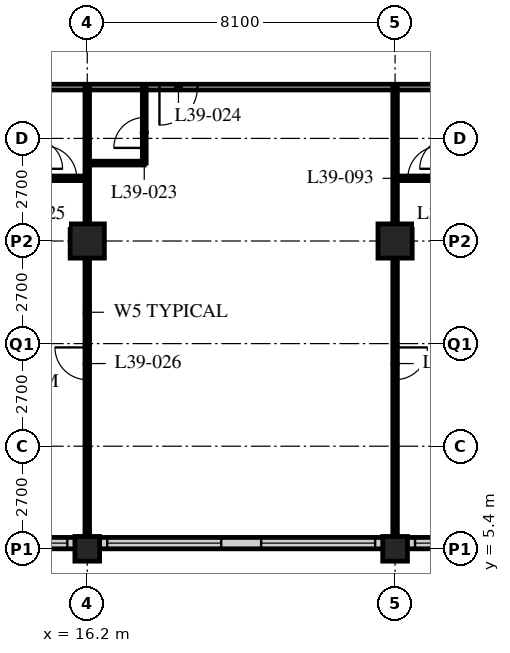
"""IFC4 building model, lengths in metres.
Left out: names, types, materials, properties, quantities, classifications, styles, units other than length and angle.
Written with IfcOpenShell. Run it as: python <this file> out.ifc"""

import sys

from ifc_helpers import new_model, si_unit, direction, frame, frame_2d, origin, origin_2d, place, context, subcontext, project, spatial, rectangle, hollow_rectangle, extrude, element, fill, save


model = new_model("IFC4")
c1 = context("Model", 3, precision=1e-05, world=origin(), true_north=direction((0.0, 1.0)))
c2 = subcontext(c1, "Body", "Model", "MODEL_VIEW")
j1 = project(units=[si_unit("LENGTHUNIT", "METRE"), si_unit("PLANEANGLEUNIT", "RADIAN")], contexts=[c1])
p1 = place(None, origin())
s1 = spatial("IfcSite", under=j1, at=p1, CompositionType="ELEMENT")
p2 = place(p1, origin())
s2 = spatial("IfcBuilding", under=s1, at=p2, CompositionType="ELEMENT")
p3 = place(p2, frame((0.0, 0.0, 151.0)))
s3 = spatial("IfcBuildingStorey", under=s2, at=p3, CompositionType="ELEMENT", Elevation=151.0)
p4 = place(p3, frame((16.2, 5.4, 0.0), z_axis=(0.0, 0.0, 1.0), x_axis=(1.0, 0.0, 0.0)))
e1 = element("IfcColumn", 1, at=p4, inside=s3, PredefinedType="COLUMN", context=c2, shape_type="SweptSolid", body=[
    extrude(hollow_rectangle(XDim=0.65, YDim=0.65, WallThickness=0.055, at=origin_2d()), origin(), (0.0, 0.0, 1.0), 3.4),
])
p5 = place(p3, frame((16.2, 13.5, 0.0), z_axis=(0.0, 0.0, 1.0), x_axis=(1.0, 0.0, 0.0)))
e2 = element("IfcColumn", 2, at=p5, inside=s3, PredefinedType="COLUMN", context=c2, shape_type="SweptSolid", body=[
    extrude(hollow_rectangle(XDim=0.9, YDim=0.9, WallThickness=0.1, at=origin_2d()), origin(), (0.0, 0.0, 1.0), 3.4),
])
p6 = place(p3, frame((24.3, 5.4, 0.0), z_axis=(0.0, 0.0, 1.0), x_axis=(1.0, 0.0, 0.0)))
e3 = element("IfcColumn", 3, at=p6, inside=s3, PredefinedType="COLUMN", context=c2, shape_type="SweptSolid", body=[
    extrude(hollow_rectangle(XDim=0.65, YDim=0.65, WallThickness=0.055, at=origin_2d()), origin(), (0.0, 0.0, 1.0), 3.4),
])
p7 = place(p3, frame((24.3, 13.5, 0.0), z_axis=(0.0, 0.0, 1.0), x_axis=(1.0, 0.0, 0.0)))
e4 = element("IfcColumn", 4, at=p7, inside=s3, PredefinedType="COLUMN", context=c2, shape_type="SweptSolid", body=[
    extrude(hollow_rectangle(XDim=0.9, YDim=0.9, WallThickness=0.1, at=origin_2d()), origin(), (0.0, 0.0, 1.0), 3.4),
])
p8 = place(p3, frame((8.4, 5.55, 0.0), z_axis=(0.0, 0.0, 1.0), x_axis=(1.0, 0.0, 0.0)))
e5 = element("IfcWall", 5, at=p8, inside=s3, PredefinedType="SOLIDWALL", context=c2, shape_type="SweptSolid", body=[
    extrude(rectangle(XDim=40.2, YDim=0.3, at=frame_2d((20.1, 0.0))), origin(), (0.0, 0.0, 1.0), 3.19),
])
p9 = place(p8, frame((0.225, 0.0, 0.9)))
e6 = element("IfcOpeningElement", 6, at=p9, cuts=e5, PredefinedType="OPENING", context=c2, shape_type="SweptSolid", body=[
    extrude(rectangle(XDim=3.0, YDim=1.4, at=frame_2d((1.5, 0.7))), frame((0.0, 0.16, 0.0), z_axis=(0.0, -1.0, 0.0), x_axis=(1.0, 0.0, 0.0)), (0.0, 0.0, 1.0), 0.32),
])
p10 = place(p8, frame((4.275, 0.0, 0.9)))
e7 = element("IfcOpeningElement", 7, at=p10, cuts=e5, PredefinedType="OPENING", context=c2, shape_type="SweptSolid", body=[
    extrude(rectangle(XDim=3.0, YDim=1.4, at=frame_2d((1.5, 0.7))), frame((0.0, 0.16, 0.0), z_axis=(0.0, -1.0, 0.0), x_axis=(1.0, 0.0, 0.0)), (0.0, 0.0, 1.0), 0.32),
])
p11 = place(p8, frame((8.325, 0.0, 0.9)))
e8 = element("IfcOpeningElement", 8, at=p11, cuts=e5, PredefinedType="OPENING", context=c2, shape_type="SweptSolid", body=[
    extrude(rectangle(XDim=3.0, YDim=1.4, at=frame_2d((1.5, 0.7))), frame((0.0, 0.16, 0.0), z_axis=(0.0, -1.0, 0.0), x_axis=(1.0, 0.0, 0.0)), (0.0, 0.0, 1.0), 0.32),
])
p12 = place(p8, frame((12.375, 0.0, 0.9)))
e9 = element("IfcOpeningElement", 9, at=p12, cuts=e5, PredefinedType="OPENING", context=c2, shape_type="SweptSolid", body=[
    extrude(rectangle(XDim=3.0, YDim=1.4, at=frame_2d((1.5, 0.7))), frame((0.0, 0.16, 0.0), z_axis=(0.0, -1.0, 0.0), x_axis=(1.0, 0.0, 0.0)), (0.0, 0.0, 1.0), 0.32),
])
p13 = place(p8, frame((16.425, 0.0, 0.9)))
e10 = element("IfcOpeningElement", 10, at=p13, cuts=e5, PredefinedType="OPENING", context=c2, shape_type="SweptSolid", body=[
    extrude(rectangle(XDim=3.0, YDim=1.4, at=frame_2d((1.5, 0.7))), frame((0.0, 0.16, 0.0), z_axis=(0.0, -1.0, 0.0), x_axis=(1.0, 0.0, 0.0)), (0.0, 0.0, 1.0), 0.32),
])
p14 = place(p8, frame((20.475, 0.0, 0.9)))
e11 = element("IfcOpeningElement", 11, at=p14, cuts=e5, PredefinedType="OPENING", context=c2, shape_type="SweptSolid", body=[
    extrude(rectangle(XDim=3.0, YDim=1.4, at=frame_2d((1.5, 0.7))), frame((0.0, 0.16, 0.0), z_axis=(0.0, -1.0, 0.0), x_axis=(1.0, 0.0, 0.0)), (0.0, 0.0, 1.0), 0.32),
])
p15 = place(p8, frame((24.525, 0.0, 0.9)))
e12 = element("IfcOpeningElement", 12, at=p15, cuts=e5, PredefinedType="OPENING", context=c2, shape_type="SweptSolid", body=[
    extrude(rectangle(XDim=3.0, YDim=1.4, at=frame_2d((1.5, 0.7))), frame((0.0, 0.16, 0.0), z_axis=(0.0, -1.0, 0.0), x_axis=(1.0, 0.0, 0.0)), (0.0, 0.0, 1.0), 0.32),
])
p16 = place(p8, frame((28.575, 0.0, 0.9)))
e13 = element("IfcOpeningElement", 13, at=p16, cuts=e5, PredefinedType="OPENING", context=c2, shape_type="SweptSolid", body=[
    extrude(rectangle(XDim=3.0, YDim=1.4, at=frame_2d((1.5, 0.7))), frame((0.0, 0.16, 0.0), z_axis=(0.0, -1.0, 0.0), x_axis=(1.0, 0.0, 0.0)), (0.0, 0.0, 1.0), 0.32),
])
p17 = place(p8, frame((32.625, 0.0, 0.9)))
e14 = element("IfcOpeningElement", 14, at=p17, cuts=e5, PredefinedType="OPENING", context=c2, shape_type="SweptSolid", body=[
    extrude(rectangle(XDim=3.0, YDim=1.4, at=frame_2d((1.5, 0.7))), frame((0.0, 0.16, 0.0), z_axis=(0.0, -1.0, 0.0), x_axis=(1.0, 0.0, 0.0)), (0.0, 0.0, 1.0), 0.32),
])
p18 = place(p8, frame((36.675, 0.0, 0.9)))
e15 = element("IfcOpeningElement", 15, at=p18, cuts=e5, PredefinedType="OPENING", context=c2, shape_type="SweptSolid", body=[
    extrude(rectangle(XDim=3.0, YDim=1.4, at=frame_2d((1.5, 0.7))), frame((0.0, 0.16, 0.0), z_axis=(0.0, -1.0, 0.0), x_axis=(1.0, 0.0, 0.0)), (0.0, 0.0, 1.0), 0.32),
])
p19 = place(p3, frame((8.1, 17.55, 0.0), z_axis=(0.0, 0.0, 1.0), x_axis=(1.0, 0.0, 0.0)))
e16 = element("IfcWall", 16, at=p19, inside=s3, PredefinedType="PARTITIONING", context=c2, shape_type="SweptSolid", body=[
    extrude(rectangle(XDim=40.5, YDim=0.15, at=frame_2d((20.25, 0.0))), origin(), (0.0, 0.0, 1.0), 3.19),
])
p20 = place(p19, frame((10.0, 0.0, 0.0)))
e17 = element("IfcOpeningElement", 17, at=p20, cuts=e16, PredefinedType="OPENING", context=c2, shape_type="SweptSolid", body=[
    extrude(rectangle(XDim=1.0, YDim=2.1, at=frame_2d((0.5, 1.05))), frame((0.0, 0.085, 0.0), z_axis=(0.0, -1.0, 0.0), x_axis=(1.0, 0.0, 0.0)), (0.0, 0.0, 1.0), 0.17),
])
p21 = place(p19, frame((22.15, 0.0, 0.0)))
e18 = element("IfcOpeningElement", 18, at=p21, cuts=e16, PredefinedType="OPENING", context=c2, shape_type="SweptSolid", body=[
    extrude(rectangle(XDim=1.0, YDim=2.1, at=frame_2d((0.5, 1.05))), frame((0.0, 0.085, 0.0), z_axis=(0.0, -1.0, 0.0), x_axis=(1.0, 0.0, 0.0)), (0.0, 0.0, 1.0), 0.17),
])
p22 = place(p19, frame((30.8, 0.0, 0.0)))
e19 = element("IfcOpeningElement", 19, at=p22, cuts=e16, PredefinedType="OPENING", context=c2, shape_type="SweptSolid", body=[
    extrude(rectangle(XDim=1.0, YDim=2.1, at=frame_2d((0.5, 1.05))), frame((0.0, 0.085, 0.0), z_axis=(0.0, -1.0, 0.0), x_axis=(1.0, 0.0, 0.0)), (0.0, 0.0, 1.0), 0.17),
])
p23 = place(p19, frame((34.85, 0.0, 0.0)))
e20 = element("IfcOpeningElement", 20, at=p23, cuts=e16, PredefinedType="OPENING", context=c2, shape_type="SweptSolid", body=[
    extrude(rectangle(XDim=1.0, YDim=2.1, at=frame_2d((0.5, 1.05))), frame((0.0, 0.085, 0.0), z_axis=(0.0, -1.0, 0.0), x_axis=(1.0, 0.0, 0.0)), (0.0, 0.0, 1.0), 0.17),
])
p24 = place(p19, frame((1.525, 0.0, 0.0)))
e21 = element("IfcOpeningElement", 21, at=p24, cuts=e16, PredefinedType="OPENING", context=c2, shape_type="SweptSolid", body=[
    extrude(rectangle(XDim=1.0, YDim=2.1, at=frame_2d((0.5, 1.05))), frame((0.0, 0.085, 0.0), z_axis=(0.0, -1.0, 0.0), x_axis=(1.0, 0.0, 0.0)), (0.0, 0.0, 1.0), 0.17),
])
p25 = place(p19, frame((37.975, 0.0, 0.0)))
e22 = element("IfcOpeningElement", 22, at=p25, cuts=e16, PredefinedType="OPENING", context=c2, shape_type="SweptSolid", body=[
    extrude(rectangle(XDim=1.0, YDim=2.1, at=frame_2d((0.5, 1.05))), frame((0.0, 0.085, 0.0), z_axis=(0.0, -1.0, 0.0), x_axis=(1.0, 0.0, 0.0)), (0.0, 0.0, 1.0), 0.17),
])
p26 = place(p3, frame((16.2, 15.55, 0.0), z_axis=(0.0, 0.0, 1.0), x_axis=(1.0, 0.0, 0.0)))
e23 = element("IfcWall", 23, at=p26, inside=s3, PredefinedType="PARTITIONING", context=c2, shape_type="SweptSolid", body=[
    extrude(rectangle(XDim=1.5, YDim=0.1, at=frame_2d((0.75, 0.0))), origin(), (0.0, 0.0, 1.0), 3.19),
])
p27 = place(p3, frame((17.7, 17.55, 0.0), z_axis=(0.0, 0.0, 1.0), x_axis=(0.0, -1.0, 0.0)))
e24 = element("IfcWall", 24, at=p27, inside=s3, PredefinedType="PARTITIONING", context=c2, shape_type="SweptSolid", body=[
    extrude(rectangle(XDim=2.0, YDim=0.1, at=frame_2d((1.0, 0.0))), origin(), (0.0, 0.0, 1.0), 3.19),
])
p28 = place(p27, frame((0.8, 0.0, 0.0)))
e25 = element("IfcOpeningElement", 25, at=p28, cuts=e24, PredefinedType="OPENING", context=c2, shape_type="SweptSolid", body=[
    extrude(rectangle(XDim=0.8, YDim=2.1, at=frame_2d((0.4, 1.05))), frame((0.0, 0.06, 0.0), z_axis=(0.0, -1.0, 0.0), x_axis=(1.0, 0.0, 0.0)), (0.0, 0.0, 1.0), 0.12),
])
p29 = place(p3, frame((16.2, 17.55, 0.0), z_axis=(0.0, 0.0, 1.0), x_axis=(0.0, -1.0, 0.0)))
e26 = element("IfcWall", 26, at=p29, inside=s3, PredefinedType="PARTITIONING", context=c2, shape_type="SweptSolid", body=[
    extrude(rectangle(XDim=11.85, YDim=0.12, at=frame_2d((5.925, 0.0))), origin(), (0.0, 0.0, 1.0), 2.42),
])
p30 = place(p29, frame((6.85, 0.0, 0.0)))
e27 = element("IfcOpeningElement", 27, at=p30, cuts=e26, PredefinedType="OPENING", context=c2, shape_type="SweptSolid", body=[
    extrude(rectangle(XDim=0.85, YDim=2.1, at=frame_2d((0.425, 1.05))), frame((0.0, 0.07, 0.0), z_axis=(0.0, -1.0, 0.0), x_axis=(1.0, 0.0, 0.0)), (0.0, 0.0, 1.0), 0.14),
])
p31 = place(p3, frame((24.3, 17.55, 0.0), z_axis=(0.0, 0.0, 1.0), x_axis=(0.0, -1.0, 0.0)))
e28 = element("IfcWall", 28, at=p31, inside=s3, PredefinedType="PARTITIONING", context=c2, shape_type="SweptSolid", body=[
    extrude(rectangle(XDim=11.85, YDim=0.12, at=frame_2d((5.925, 0.0))), origin(), (0.0, 0.0, 1.0), 2.42),
])
p32 = place(p31, frame((6.85, 0.0, 0.0)))
e29 = element("IfcOpeningElement", 29, at=p32, cuts=e28, PredefinedType="OPENING", context=c2, shape_type="SweptSolid", body=[
    extrude(rectangle(XDim=0.85, YDim=2.1, at=frame_2d((0.425, 1.05))), frame((0.0, 0.07, 0.0), z_axis=(0.0, -1.0, 0.0), x_axis=(1.0, 0.0, 0.0)), (0.0, 0.0, 1.0), 0.14),
])
p33 = place(p3, frame((16.2, 15.15, 0.0), z_axis=(0.0, 0.0, 1.0), x_axis=(-1.0, 0.0, 0.0)))
e30 = element("IfcWall", 30, at=p33, inside=s3, PredefinedType="PARTITIONING", context=c2, shape_type="SweptSolid", body=[
    extrude(rectangle(XDim=1.46, YDim=0.12, at=frame_2d((0.73, 0.0))), origin(), (0.0, 0.0, 1.0), 3.19),
])
p34 = place(p33, frame((0.275, 0.0, 0.0)))
e31 = element("IfcOpeningElement", 31, at=p34, cuts=e30, PredefinedType="OPENING", context=c2, shape_type="SweptSolid", body=[
    extrude(rectangle(XDim=0.85, YDim=2.1, at=frame_2d((0.425, 1.05))), frame((0.0, 0.07, 0.0), z_axis=(0.0, -1.0, 0.0), x_axis=(1.0, 0.0, 0.0)), (0.0, 0.0, 1.0), 0.14),
])
p35 = place(p3, frame((25.76, 15.15, 0.0), z_axis=(0.0, 0.0, 1.0), x_axis=(-1.0, 0.0, 0.0)))
e32 = element("IfcWall", 32, at=p35, inside=s3, PredefinedType="PARTITIONING", context=c2, shape_type="SweptSolid", body=[
    extrude(rectangle(XDim=1.46, YDim=0.12, at=frame_2d((0.73, 0.0))), origin(), (0.0, 0.0, 1.0), 3.19),
])
p36 = place(p35, frame((0.275, 0.0, 0.0)))
e33 = element("IfcOpeningElement", 33, at=p36, cuts=e32, PredefinedType="OPENING", context=c2, shape_type="SweptSolid", body=[
    extrude(rectangle(XDim=0.85, YDim=2.1, at=frame_2d((0.425, 1.05))), frame((0.0, 0.07, 0.0), z_axis=(0.0, -1.0, 0.0), x_axis=(1.0, 0.0, 0.0)), (0.0, 0.0, 1.0), 0.14),
])
p37 = place(p10, origin())
e34 = element("IfcWindow", 34, at=p37, inside=s3, PartitioningType="SINGLE_PANEL", PredefinedType="WINDOW", context=c2, shape_type="SweptSolid", body=[
    extrude(rectangle(XDim=3.0, YDim=1.4, at=frame_2d((1.5, 0.7))), frame((0.0, 0.03, 0.0), z_axis=(0.0, -1.0, 0.0), x_axis=(1.0, 0.0, 0.0)), (0.0, 0.0, 1.0), 0.06),
])
fill(e7, e34)
p38 = place(p11, origin())
e35 = element("IfcWindow", 35, at=p38, inside=s3, PartitioningType="SINGLE_PANEL", PredefinedType="WINDOW", context=c2, shape_type="SweptSolid", body=[
    extrude(rectangle(XDim=3.0, YDim=1.4, at=frame_2d((1.5, 0.7))), frame((0.0, 0.03, 0.0), z_axis=(0.0, -1.0, 0.0), x_axis=(1.0, 0.0, 0.0)), (0.0, 0.0, 1.0), 0.06),
])
fill(e8, e35)
p39 = place(p12, origin())
e36 = element("IfcWindow", 36, at=p39, inside=s3, PartitioningType="SINGLE_PANEL", PredefinedType="WINDOW", context=c2, shape_type="SweptSolid", body=[
    extrude(rectangle(XDim=3.0, YDim=1.4, at=frame_2d((1.5, 0.7))), frame((0.0, 0.03, 0.0), z_axis=(0.0, -1.0, 0.0), x_axis=(1.0, 0.0, 0.0)), (0.0, 0.0, 1.0), 0.06),
])
fill(e9, e36)
p40 = place(p13, origin())
e37 = element("IfcWindow", 37, at=p40, inside=s3, PartitioningType="SINGLE_PANEL", PredefinedType="WINDOW", context=c2, shape_type="SweptSolid", body=[
    extrude(rectangle(XDim=3.0, YDim=1.4, at=frame_2d((1.5, 0.7))), frame((0.0, 0.03, 0.0), z_axis=(0.0, -1.0, 0.0), x_axis=(1.0, 0.0, 0.0)), (0.0, 0.0, 1.0), 0.06),
])
fill(e10, e37)
p41 = place(p28, origin())
e38 = element("IfcDoor", 38, at=p41, inside=s3, OperationType="SINGLE_SWING_LEFT", PredefinedType="DOOR", context=c2, shape_type="SweptSolid", body=[
    extrude(rectangle(XDim=0.8, YDim=2.1, at=frame_2d((0.4, 1.05))), frame((0.0, 0.025, 0.0), z_axis=(0.0, -1.0, 0.0), x_axis=(1.0, 0.0, 0.0)), (0.0, 0.0, 1.0), 0.05),
])
fill(e25, e38)
p42 = place(p20, origin())
e39 = element("IfcDoor", 39, at=p42, inside=s3, OperationType="SINGLE_SWING_RIGHT", PredefinedType="DOOR", context=c2, shape_type="SweptSolid", body=[
    extrude(rectangle(XDim=1.0, YDim=2.1, at=frame_2d((0.5, 1.05))), frame((0.0, 0.025, 0.0), z_axis=(0.0, -1.0, 0.0), x_axis=(1.0, 0.0, 0.0)), (0.0, 0.0, 1.0), 0.05),
])
fill(e17, e39)
p43 = place(p30, origin())
e40 = element("IfcDoor", 40, at=p43, inside=s3, OperationType="SINGLE_SWING_RIGHT", PredefinedType="DOOR", context=c2, shape_type="SweptSolid", body=[
    extrude(rectangle(XDim=0.85, YDim=2.1, at=frame_2d((0.425, 1.05))), frame((0.0, 0.025, 0.0), z_axis=(0.0, -1.0, 0.0), x_axis=(1.0, 0.0, 0.0)), (0.0, 0.0, 1.0), 0.05),
])
fill(e27, e40)
p44 = place(p32, origin())
e41 = element("IfcDoor", 41, at=p44, inside=s3, OperationType="SINGLE_SWING_LEFT", PredefinedType="DOOR", context=c2, shape_type="SweptSolid", body=[
    extrude(rectangle(XDim=0.85, YDim=2.1, at=frame_2d((0.425, 1.05))), frame((0.0, 0.025, 0.0), z_axis=(0.0, -1.0, 0.0), x_axis=(1.0, 0.0, 0.0)), (0.0, 0.0, 1.0), 0.05),
])
fill(e29, e41)
p45 = place(p34, origin())
e42 = element("IfcDoor", 42, at=p45, inside=s3, OperationType="SINGLE_SWING_LEFT", PredefinedType="DOOR", context=c2, shape_type="SweptSolid", body=[
    extrude(rectangle(XDim=0.85, YDim=2.1, at=frame_2d((0.425, 1.05))), frame((0.0, 0.025, 0.0), z_axis=(0.0, -1.0, 0.0), x_axis=(1.0, 0.0, 0.0)), (0.0, 0.0, 1.0), 0.05),
])
fill(e31, e42)
p46 = place(p36, origin())
e43 = element("IfcDoor", 43, at=p46, inside=s3, OperationType="SINGLE_SWING_RIGHT", PredefinedType="DOOR", context=c2, shape_type="SweptSolid", body=[
    extrude(rectangle(XDim=0.85, YDim=2.1, at=frame_2d((0.425, 1.05))), frame((0.0, 0.025, 0.0), z_axis=(0.0, -1.0, 0.0), x_axis=(1.0, 0.0, 0.0)), (0.0, 0.0, 1.0), 0.05),
])
fill(e33, e43)
save(model, sys.argv[1])
